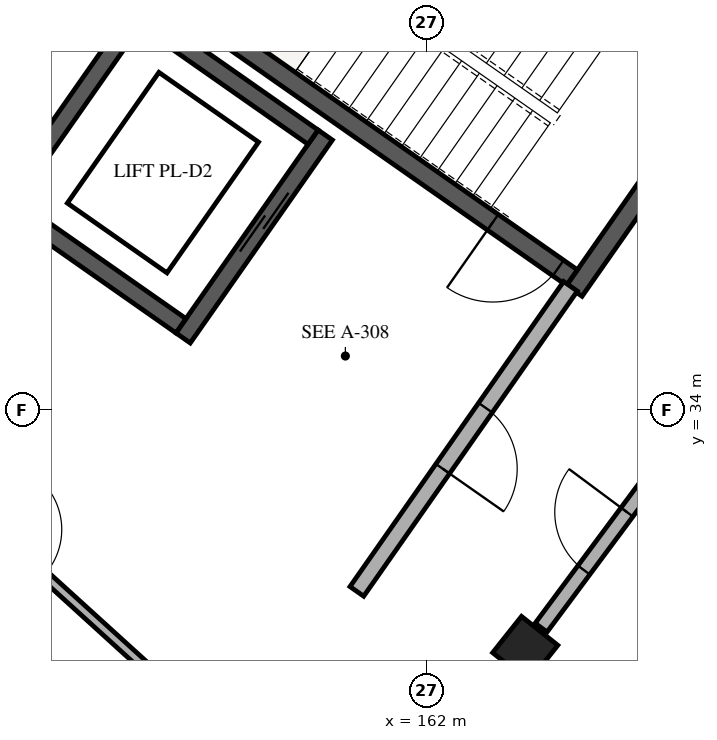
"""IFC4 building model, lengths in metres.
Left out: names, types, materials, properties, quantities, classifications, styles, units other than length and angle.
Written with IfcOpenShell. Run it as: python <this file> out.ifc"""

import sys

from ifc_helpers import new_model, si_unit, direction, frame, frame_2d, origin, origin_2d, place, context, subcontext, project, spatial, rectangle, extrude, element, fill, save


model = new_model("IFC4")
c1 = context("Model", 3, precision=1e-05, world=origin(), true_north=direction((0.0, 1.0)))
c2 = subcontext(c1, "Body", "Model", "MODEL_VIEW")
j1 = project(units=[si_unit("LENGTHUNIT", "METRE"), si_unit("PLANEANGLEUNIT", "RADIAN")], contexts=[c1])
p1 = place(None, origin())
s1 = spatial("IfcSite", under=j1, at=p1, CompositionType="ELEMENT")
p2 = place(p1, origin())
s2 = spatial("IfcBuilding", under=s1, at=p2, CompositionType="ELEMENT")
p3 = place(p2, frame((0.0, 0.0, 4.76)))
s3 = spatial("IfcBuildingStorey", under=s2, at=p3, CompositionType="ELEMENT", Elevation=4.76)
p4 = place(p3, frame((165.733, 38.336, 0.0), z_axis=(0.0, 0.0, 1.0), x_axis=(-0.819153711596, 0.573574055182, 0.0)))
e1 = element("IfcWall", 1, at=p4, inside=s3, PredefinedType="SHEAR", context=c2, shape_type="SweptSolid", body=[
    extrude(rectangle(XDim=6.6, YDim=0.25, at=frame_2d((3.3, 0.0))), origin(), (0.0, 0.0, 1.0), 3.83),
])
p5 = place(p3, frame((165.907, 38.366, 0.0), z_axis=(0.0, 0.0, 1.0), x_axis=(-0.573582112484, -0.819148069789, 0.0)))
e2 = element("IfcWall", 2, at=p5, inside=s3, PredefinedType="SHEAR", context=c2, shape_type="SweptSolid", body=[
    extrude(rectangle(XDim=3.42, YDim=0.25, at=frame_2d((1.71, 0.0))), origin(), (0.0, 0.0, 1.0), 3.83),
])
p6 = place(p3, frame((163.914, 35.739, 0.0), z_axis=(0.0, 0.0, 1.0), x_axis=(-0.819153711596, 0.573574055182, 0.0)))
e3 = element("IfcWall", 3, at=p6, inside=s3, PredefinedType="SHEAR", context=c2, shape_type="SweptSolid", body=[
    extrude(rectangle(XDim=6.6, YDim=0.25, at=frame_2d((3.3, 0.0))), origin(), (0.0, 0.0, 1.0), 3.83),
])
p7 = place(p6, frame((0.22, 0.0, 0.0)))
e4 = element("IfcOpeningElement", 4, at=p7, cuts=e3, PredefinedType="OPENING", context=c2, shape_type="SweptSolid", body=[
    extrude(rectangle(XDim=1.05, YDim=2.15, at=frame_2d((0.525, 1.075))), frame((0.0, 0.135, 0.0), z_axis=(0.0, -1.0, 0.0), x_axis=(1.0, 0.0, 0.0)), (0.0, 0.0, 1.0), 0.27),
])
p8 = place(p3, frame((160.668, 37.615, 0.0), z_axis=(0.0, 0.0, 1.0), x_axis=(-0.573582966431, -0.819147471839, 0.0)))
e5 = element("IfcWall", 5, at=p8, inside=s3, PredefinedType="SHEAR", context=c2, shape_type="SweptSolid", body=[
    extrude(rectangle(XDim=3.26, YDim=0.23, at=frame_2d((1.63, 0.0))), origin(), (0.0, 0.0, 1.0), 3.83),
])
p9 = place(p8, frame((0.9, 0.0, 0.0)))
e6 = element("IfcOpeningElement", 6, at=p9, cuts=e5, PredefinedType="OPENING", context=c2, shape_type="SweptSolid", body=[
    extrude(rectangle(XDim=1.0, YDim=2.15, at=frame_2d((0.5, 1.075))), frame((0.0, 0.125, 0.0), z_axis=(0.0, -1.0, 0.0), x_axis=(1.0, 0.0, 0.0)), (0.0, 0.0, 1.0), 0.25),
])
p10 = place(p3, frame((158.268, 39.296, 0.0), z_axis=(0.0, 0.0, 1.0), x_axis=(-0.573582966431, -0.819147471839, 0.0)))
e7 = element("IfcWall", 7, at=p10, inside=s3, PredefinedType="SHEAR", context=c2, shape_type="SweptSolid", body=[
    extrude(rectangle(XDim=3.26, YDim=0.23, at=frame_2d((1.63, 0.0))), origin(), (0.0, 0.0, 1.0), 3.83),
])
p11 = place(p3, frame((160.508, 37.587, 0.0), z_axis=(0.0, 0.0, 1.0), x_axis=(-0.819189439894, 0.573523026186, 0.0)))
e8 = element("IfcWall", 8, at=p11, inside=s3, PredefinedType="SHEAR", context=c2, shape_type="SweptSolid", body=[
    extrude(rectangle(XDim=2.7, YDim=0.23, at=frame_2d((1.35, 0.0))), origin(), (0.0, 0.0, 1.0), 3.83),
])
p12 = place(p3, frame((158.77, 35.105, 0.0), z_axis=(0.0, 0.0, 1.0), x_axis=(-0.819117209968, 0.573626181702, 0.0)))
e9 = element("IfcWall", 9, at=p12, inside=s3, PredefinedType="SHEAR", context=c2, shape_type="SweptSolid", body=[
    extrude(rectangle(XDim=2.7, YDim=0.23, at=frame_2d((1.35, 0.0))), origin(), (0.0, 0.0, 1.0), 3.83),
])
p13 = place(p3, frame((163.3, 30.853, 0.0), z_axis=(0.0, 0.0, 1.0), x_axis=(0.782608156852, -0.622514636638, 0.0)))
e10 = element("IfcColumn", 10, at=p13, inside=s3, PredefinedType="COLUMN", context=c2, shape_type="SweptSolid", body=[
    extrude(rectangle(XDim=0.61, YDim=0.61, at=origin_2d()), origin(), (0.0, 0.0, 1.0), 3.825),
])
p14 = place(p3, frame((163.895, 35.624, 0.0), z_axis=(0.0, 0.0, 1.0), x_axis=(-0.573572687386, -0.819154669329, 0.0)))
e11 = element("IfcWall", 11, at=p14, inside=s3, PredefinedType="PARTITIONING", context=c2, shape_type="SweptSolid", body=[
    extrude(rectangle(XDim=4.9, YDim=0.22, at=frame_2d((2.45, 0.0))), origin(), (0.0, 0.0, 1.0), 3.06),
])
p15 = place(p14, frame((1.95, 0.0, 0.0)))
e12 = element("IfcOpeningElement", 12, at=p15, cuts=e11, PredefinedType="OPENING", context=c2, shape_type="SweptSolid", body=[
    extrude(rectangle(XDim=0.98, YDim=2.14, at=frame_2d((0.49, 1.07))), frame((0.0, 0.12, 0.0), z_axis=(0.0, -1.0, 0.0), x_axis=(1.0, 0.0, 0.0)), (0.0, 0.0, 1.0), 0.24),
])
p16 = place(p3, frame((154.199, 34.344, 0.0), z_axis=(0.0, 0.0, 1.0), x_axis=(0.74023124711, -0.672352363573, 0.0)))
e13 = element("IfcWall", 13, at=p16, inside=s3, PredefinedType="PARTITIONING", context=c2, shape_type="SweptSolid", body=[
    extrude(rectangle(XDim=6.6, YDim=0.125, at=frame_2d((3.3, 0.0))), origin(), (0.0, 0.0, 1.0), 3.09),
])
p17 = place(p16, frame((2.855, 0.0, 0.0)))
e14 = element("IfcOpeningElement", 14, at=p17, cuts=e13, PredefinedType="OPENING", context=c2, shape_type="SweptSolid", body=[
    extrude(rectangle(XDim=0.89, YDim=2.1, at=frame_2d((0.445, 1.05))), frame((0.0, 0.073, 0.0), z_axis=(0.0, -1.0, 0.0), x_axis=(1.0, 0.0, 0.0)), (0.0, 0.0, 1.0), 0.145),
])
p18 = place(p3, frame((163.509, 31.134, 0.0), z_axis=(0.0, 0.0, 1.0), x_axis=(0.596552136601, 0.802574325727, 0.0)))
e15 = element("IfcWall", 15, at=p18, inside=s3, PredefinedType="PARTITIONING", context=c2, shape_type="SweptSolid", body=[
    extrude(rectangle(XDim=2.837, YDim=0.195, at=frame_2d((1.418, 0.0))), origin(), (0.0, 0.0, 1.0), 3.09),
])
p19 = place(p18, frame((0.944, 0.0, 0.0)))
e16 = element("IfcOpeningElement", 16, at=p19, cuts=e15, PredefinedType="OPENING", context=c2, shape_type="SweptSolid", body=[
    extrude(rectangle(XDim=0.95, YDim=2.13, at=frame_2d((0.475, 1.065))), frame((0.0, 0.107, 0.0), z_axis=(0.0, -1.0, 0.0), x_axis=(1.0, 0.0, 0.0)), (0.0, 0.0, 1.0), 0.215),
])
p20 = place(p7, origin())
e17 = element("IfcDoor", 17, at=p20, inside=s3, OperationType="SINGLE_SWING_RIGHT", PredefinedType="DOOR", context=c2, shape_type="SweptSolid", body=[
    extrude(rectangle(XDim=1.05, YDim=2.15, at=frame_2d((0.525, 1.075))), frame((0.0, 0.025, 0.0), z_axis=(0.0, -1.0, 0.0), x_axis=(1.0, 0.0, 0.0)), (0.0, 0.0, 1.0), 0.05),
])
fill(e4, e17)
p21 = place(p9, origin())
e18 = element("IfcDoor", 18, at=p21, inside=s3, OperationType="DOUBLE_DOOR_SLIDING", PredefinedType="DOOR", context=c2, shape_type="SweptSolid", body=[
    extrude(rectangle(XDim=1.0, YDim=2.15, at=frame_2d((0.5, 1.075))), frame((0.0, 0.025, 0.0), z_axis=(0.0, -1.0, 0.0), x_axis=(1.0, 0.0, 0.0)), (0.0, 0.0, 1.0), 0.05),
])
fill(e6, e18)
p22 = place(p15, origin())
e19 = element("IfcDoor", 19, at=p22, inside=s3, OperationType="SINGLE_SWING_RIGHT", PredefinedType="DOOR", context=c2, shape_type="SweptSolid", body=[
    extrude(rectangle(XDim=0.98, YDim=2.14, at=frame_2d((0.49, 1.07))), frame((0.0, 0.025, 0.0), z_axis=(0.0, -1.0, 0.0), x_axis=(1.0, 0.0, 0.0)), (0.0, 0.0, 1.0), 0.05),
])
fill(e12, e19)
p23 = place(p19, origin())
e20 = element("IfcDoor", 20, at=p23, inside=s3, OperationType="SINGLE_SWING_RIGHT", PredefinedType="DOOR", context=c2, shape_type="SweptSolid", body=[
    extrude(rectangle(XDim=0.95, YDim=2.13, at=frame_2d((0.475, 1.065))), frame((0.0, 0.025, 0.0), z_axis=(0.0, -1.0, 0.0), x_axis=(1.0, 0.0, 0.0)), (0.0, 0.0, 1.0), 0.05),
])
fill(e16, e20)
save(model, sys.argv[1])
